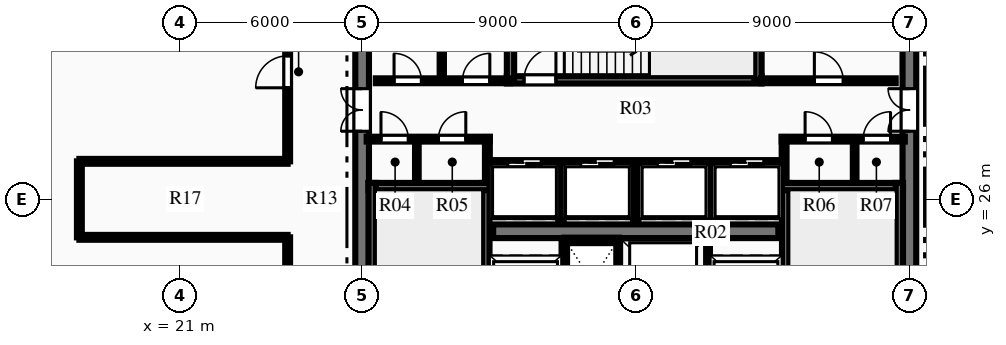
"""IFC4 building model, lengths in metres.
Left out: names, types, materials, properties, quantities, classifications, styles, units other than length and angle.
Written with IfcOpenShell. Run it as: python <this file> out.ifc"""

import sys

from ifc_helpers import new_model, si_unit, direction, frame, frame_2d, origin, place, context, subcontext, project, spatial, rectangle, extrude, element, fill, save


model = new_model("IFC4")
c1 = context("Model", 3, precision=1e-05, world=origin(), true_north=direction((0.0, 1.0)))
c2 = subcontext(c1, "Body", "Model", "MODEL_VIEW")
j1 = project(units=[si_unit("LENGTHUNIT", "METRE"), si_unit("PLANEANGLEUNIT", "RADIAN")], contexts=[c1])
p1 = place(None, origin())
s1 = spatial("IfcSite", under=j1, at=p1, CompositionType="ELEMENT")
p2 = place(p1, origin())
s2 = spatial("IfcBuilding", under=s1, at=p2, CompositionType="ELEMENT")
p3 = place(p2, frame((0.0, 0.0, 274.95)))
s3 = spatial("IfcBuildingStorey", under=s2, at=p3, CompositionType="ELEMENT", Elevation=274.95)
p4 = place(p3, frame((27.0, 18.225, 0.0), z_axis=(0.0, 0.0, 1.0), x_axis=(0.0, 1.0, 0.0)))
e1 = element("IfcWall", 1, at=p4, inside=s3, PredefinedType="SHEAR", context=c2, shape_type="SweptSolid", body=[
    extrude(rectangle(XDim=15.55, YDim=0.45, at=frame_2d((7.775, 0.0))), origin(), (0.0, 0.0, 1.0), 3.75),
])
p5 = place(p4, frame((10.015, 0.0, 0.0)))
e2 = element("IfcOpeningElement", 2, at=p5, cuts=e1, PredefinedType="OPENING", context=c2, shape_type="SweptSolid", body=[
    extrude(rectangle(XDim=1.4, YDim=2.2, at=frame_2d((0.7, 1.1))), frame((0.0, 0.235, 0.0), z_axis=(0.0, -1.0, 0.0), x_axis=(1.0, 0.0, 0.0)), (0.0, 0.0, 1.0), 0.47),
])
p6 = place(p3, frame((45.0, 18.225, 0.0), z_axis=(0.0, 0.0, 1.0), x_axis=(0.0, 1.0, 0.0)))
e3 = element("IfcWall", 3, at=p6, inside=s3, PredefinedType="SHEAR", context=c2, shape_type="SweptSolid", body=[
    extrude(rectangle(XDim=15.55, YDim=0.45, at=frame_2d((7.775, 0.0))), origin(), (0.0, 0.0, 1.0), 3.75),
])
p7 = place(p6, frame((10.015, 0.0, 0.0)))
e4 = element("IfcOpeningElement", 4, at=p7, cuts=e3, PredefinedType="OPENING", context=c2, shape_type="SweptSolid", body=[
    extrude(rectangle(XDim=1.4, YDim=2.2, at=frame_2d((0.7, 1.1))), frame((0.0, 0.235, 0.0), z_axis=(0.0, -1.0, 0.0), x_axis=(1.0, 0.0, 0.0)), (0.0, 0.0, 1.0), 0.47),
])
p8 = place(p3, frame((31.31, 24.95, 0.0), z_axis=(0.0, 0.0, 1.0), x_axis=(1.0, 0.0, 0.0)))
e5 = element("IfcWall", 5, at=p8, inside=s3, PredefinedType="SHEAR", context=c2, shape_type="SweptSolid", body=[
    extrude(rectangle(XDim=9.38, YDim=0.45, at=frame_2d((4.69, 0.0))), origin(), (0.0, 0.0, 1.0), 3.75),
])
p9 = place(p3, frame((31.07, 18.28, 0.0), z_axis=(0.0, 0.0, 1.0), x_axis=(0.0, 1.0, 0.0)))
e6 = element("IfcWall", 6, at=p9, inside=s3, PredefinedType="SHEAR", context=c2, shape_type="SweptSolid", body=[
    extrude(rectangle(XDim=8.26, YDim=0.24, at=frame_2d((4.13, 0.0))), origin(), (0.0, 0.0, 1.0), 3.75),
])
p10 = place(p9, frame((0.365, 0.0, 0.0)))
e7 = element("IfcOpeningElement", 7, at=p10, cuts=e6, PredefinedType="OPENING", context=c2, shape_type="SweptSolid", body=[
    extrude(rectangle(XDim=1.05, YDim=2.15, at=frame_2d((0.525, 1.075))), frame((0.0, 0.13, 0.0), z_axis=(0.0, -1.0, 0.0), x_axis=(1.0, 0.0, 0.0)), (0.0, 0.0, 1.0), 0.26),
])
p11 = place(p3, frame((27.21, 26.42, 0.0), z_axis=(0.0, 0.0, 1.0), x_axis=(1.0, 0.0, 0.0)))
e8 = element("IfcWall", 8, at=p11, inside=s3, PredefinedType="SHEAR", context=c2, shape_type="SweptSolid", body=[
    extrude(rectangle(XDim=3.98, YDim=0.24, at=frame_2d((1.99, 0.0))), origin(), (0.0, 0.0, 1.0), 3.75),
])
p12 = place(p3, frame((27.33, 18.28, 0.0), z_axis=(0.0, 0.0, 1.0), x_axis=(0.0, 1.0, 0.0)))
e9 = element("IfcWall", 9, at=p12, inside=s3, PredefinedType="SHEAR", context=c2, shape_type="SweptSolid", body=[
    extrude(rectangle(XDim=8.26, YDim=0.24, at=frame_2d((4.13, 0.0))), origin(), (0.0, 0.0, 1.0), 3.75),
])
p13 = place(p3, frame((40.93, 18.28, 0.0), z_axis=(0.0, 0.0, 1.0), x_axis=(0.0, 1.0, 0.0)))
e10 = element("IfcWall", 10, at=p13, inside=s3, PredefinedType="SHEAR", context=c2, shape_type="SweptSolid", body=[
    extrude(rectangle(XDim=8.26, YDim=0.24, at=frame_2d((4.13, 0.0))), origin(), (0.0, 0.0, 1.0), 3.75),
])
p14 = place(p13, frame((0.365, 0.0, 0.0)))
e11 = element("IfcOpeningElement", 11, at=p14, cuts=e10, PredefinedType="OPENING", context=c2, shape_type="SweptSolid", body=[
    extrude(rectangle(XDim=1.05, YDim=2.15, at=frame_2d((0.525, 1.075))), frame((0.0, 0.13, 0.0), z_axis=(0.0, -1.0, 0.0), x_axis=(1.0, 0.0, 0.0)), (0.0, 0.0, 1.0), 0.26),
])
p15 = place(p3, frame((40.81, 26.42, 0.0), z_axis=(0.0, 0.0, 1.0), x_axis=(1.0, 0.0, 0.0)))
e12 = element("IfcWall", 12, at=p15, inside=s3, PredefinedType="SHEAR", context=c2, shape_type="SweptSolid", body=[
    extrude(rectangle(XDim=3.98, YDim=0.24, at=frame_2d((1.99, 0.0))), origin(), (0.0, 0.0, 1.0), 3.75),
])
p16 = place(p3, frame((44.67, 18.28, 0.0), z_axis=(0.0, 0.0, 1.0), x_axis=(0.0, 1.0, 0.0)))
e13 = element("IfcWall", 13, at=p16, inside=s3, PredefinedType="SHEAR", context=c2, shape_type="SweptSolid", body=[
    extrude(rectangle(XDim=8.26, YDim=0.24, at=frame_2d((4.13, 0.0))), origin(), (0.0, 0.0, 1.0), 3.75),
])
p17 = place(p3, frame((31.76, 29.93, 0.0), z_axis=(0.0, 0.0, 1.0), x_axis=(1.0, 0.0, 0.0)))
e14 = element("IfcWall", 14, at=p17, inside=s3, PredefinedType="SHEAR", context=c2, shape_type="SweptSolid", body=[
    extrude(rectangle(XDim=8.38, YDim=0.24, at=frame_2d((4.19, 0.0))), origin(), (0.0, 0.0, 1.0), 3.75),
])
p18 = place(p17, frame((0.565, 0.0, 0.0)))
e15 = element("IfcOpeningElement", 15, at=p18, cuts=e14, PredefinedType="OPENING", context=c2, shape_type="SweptSolid", body=[
    extrude(rectangle(XDim=1.05, YDim=2.15, at=frame_2d((0.525, 1.075))), frame((0.0, 0.13, 0.0), z_axis=(0.0, -1.0, 0.0), x_axis=(1.0, 0.0, 0.0)), (0.0, 0.0, 1.0), 0.26),
])
p19 = place(p3, frame((31.88, 29.93, 0.0), z_axis=(0.0, 0.0, 1.0), x_axis=(0.0, 1.0, 0.0)))
e16 = element("IfcWall", 16, at=p19, inside=s3, PredefinedType="SHEAR", context=c2, shape_type="SweptSolid", body=[
    extrude(rectangle(XDim=3.79, YDim=0.24, at=frame_2d((1.895, 0.0))), origin(), (0.0, 0.0, 1.0), 3.75),
])
p20 = place(p3, frame((40.02, 29.93, 0.0), z_axis=(0.0, 0.0, 1.0), x_axis=(0.0, 1.0, 0.0)))
e17 = element("IfcWall", 17, at=p20, inside=s3, PredefinedType="SHEAR", context=c2, shape_type="SweptSolid", body=[
    extrude(rectangle(XDim=3.85, YDim=0.24, at=frame_2d((1.925, 0.0))), origin(), (0.0, 0.0, 1.0), 3.75),
])
for number, where, z_axis, x_axis in (
    (18, (33.65, 22.05, 0.0), (0.0, 0.0, 1.0), (0.0, 1.0, 0.0)),
    (19, (35.45, 22.05, 0.0), (0.0, 0.0, 1.0), (0.0, 1.0, 0.0)),
):
    element("IfcWall", number, at=place(p3, frame(where, z_axis=z_axis, x_axis=x_axis)), inside=s3, PredefinedType="PARTITIONING", context=c2, shape_type="SweptSolid", body=[
        extrude(rectangle(XDim=2.6, YDim=0.18, at=frame_2d((1.3, 0.0))), origin(), (0.0, 0.0, 1.0), 3.48),
    ])
p21 = place(p3, frame((33.65, 24.65, 0.0), z_axis=(0.0, 0.0, 1.0), x_axis=(1.0, 0.0, 0.0)))
e20 = element("IfcWall", 20, at=p21, inside=s3, PredefinedType="PARTITIONING", context=c2, shape_type="SweptSolid", body=[
    extrude(rectangle(XDim=1.8, YDim=0.18, at=frame_2d((0.9, 0.0))), origin(), (0.0, 0.0, 1.0), 3.48),
])
p22 = place(p3, frame((38.35, 22.05, 0.0), z_axis=(0.0, 0.0, 1.0), x_axis=(0.0, 1.0, 0.0)))
e21 = element("IfcWall", 21, at=p22, inside=s3, PredefinedType="PARTITIONING", context=c2, shape_type="SweptSolid", body=[
    extrude(rectangle(XDim=2.6, YDim=0.18, at=frame_2d((1.3, 0.0))), origin(), (0.0, 0.0, 1.0), 3.48),
])
p23 = place(p3, frame((27.15, 27.98, 0.0), z_axis=(0.0, 0.0, 1.0), x_axis=(1.0, 0.0, 0.0)))
e22 = element("IfcWall", 22, at=p23, inside=s3, PredefinedType="PARTITIONING", context=c2, shape_type="SweptSolid", body=[
    extrude(rectangle(XDim=4.05, YDim=0.16, at=frame_2d((2.025, 0.0))), origin(), (0.0, 0.0, 1.0), 3.48),
])
p24 = place(p23, frame((0.47, 0.0, 0.0)))
e23 = element("IfcOpeningElement", 23, at=p24, cuts=e22, PredefinedType="OPENING", context=c2, shape_type="SweptSolid", body=[
    extrude(rectangle(XDim=0.9, YDim=2.15, at=frame_2d((0.45, 1.075))), frame((0.0, 0.09, 0.0), z_axis=(0.0, -1.0, 0.0), x_axis=(1.0, 0.0, 0.0)), (0.0, 0.0, 1.0), 0.18),
])
p25 = place(p23, frame((2.36, 0.0, 0.0)))
e24 = element("IfcOpeningElement", 24, at=p25, cuts=e22, PredefinedType="OPENING", context=c2, shape_type="SweptSolid", body=[
    extrude(rectangle(XDim=0.9, YDim=2.15, at=frame_2d((0.45, 1.075))), frame((0.0, 0.09, 0.0), z_axis=(0.0, -1.0, 0.0), x_axis=(1.0, 0.0, 0.0)), (0.0, 0.0, 1.0), 0.18),
])
p26 = place(p3, frame((31.12, 26.54, 0.0), z_axis=(0.0, 0.0, 1.0), x_axis=(0.0, 1.0, 0.0)))
e25 = element("IfcWall", 25, at=p26, inside=s3, PredefinedType="PARTITIONING", context=c2, shape_type="SweptSolid", body=[
    extrude(rectangle(XDim=1.51, YDim=0.16, at=frame_2d((0.755, 0.0))), origin(), (0.0, 0.0, 1.0), 3.48),
])
p27 = place(p3, frame((40.8, 27.98, 0.0), z_axis=(0.0, 0.0, 1.0), x_axis=(1.0, 0.0, 0.0)))
e26 = element("IfcWall", 26, at=p27, inside=s3, PredefinedType="PARTITIONING", context=c2, shape_type="SweptSolid", body=[
    extrude(rectangle(XDim=4.05, YDim=0.16, at=frame_2d((2.025, 0.0))), origin(), (0.0, 0.0, 1.0), 3.48),
])
p28 = place(p27, frame((0.77, 0.0, 0.0)))
e27 = element("IfcOpeningElement", 27, at=p28, cuts=e26, PredefinedType="OPENING", context=c2, shape_type="SweptSolid", body=[
    extrude(rectangle(XDim=0.9, YDim=2.15, at=frame_2d((0.45, 1.075))), frame((0.0, 0.09, 0.0), z_axis=(0.0, -1.0, 0.0), x_axis=(1.0, 0.0, 0.0)), (0.0, 0.0, 1.0), 0.18),
])
p29 = place(p27, frame((2.68, 0.0, 0.0)))
e28 = element("IfcOpeningElement", 28, at=p29, cuts=e26, PredefinedType="OPENING", context=c2, shape_type="SweptSolid", body=[
    extrude(rectangle(XDim=0.9, YDim=2.15, at=frame_2d((0.45, 1.075))), frame((0.0, 0.09, 0.0), z_axis=(0.0, -1.0, 0.0), x_axis=(1.0, 0.0, 0.0)), (0.0, 0.0, 1.0), 0.18),
])
p30 = place(p3, frame((40.88, 26.54, 0.0), z_axis=(0.0, 0.0, 1.0), x_axis=(0.0, 1.0, 0.0)))
e29 = element("IfcWall", 29, at=p30, inside=s3, PredefinedType="PARTITIONING", context=c2, shape_type="SweptSolid", body=[
    extrude(rectangle(XDim=1.51, YDim=0.16, at=frame_2d((0.755, 0.0))), origin(), (0.0, 0.0, 1.0), 3.48),
])
for number, where, z_axis, x_axis in (
    (30, (28.8, 26.54, 0.0), (0.0, 0.0, 1.0), (0.0, 1.0, 0.0)),
    (31, (43.2, 26.54, 0.0), (0.0, 0.0, 1.0), (0.0, 1.0, 0.0)),
):
    element("IfcWall", number, at=place(p3, frame(where, z_axis=z_axis, x_axis=x_axis)), inside=s3, PredefinedType="PARTITIONING", context=c2, shape_type="SweptSolid", body=[
        extrude(rectangle(XDim=1.44, YDim=0.12, at=frame_2d((0.72, 0.0))), origin(), (0.0, 0.0, 1.0), 3.48),
    ])
p31 = place(p3, frame((27.45, 29.9, 0.0), z_axis=(0.0, 0.0, 1.0), x_axis=(1.0, 0.0, 0.0)))
e32 = element("IfcWall", 32, at=p31, inside=s3, PredefinedType="PARTITIONING", context=c2, shape_type="SweptSolid", body=[
    extrude(rectangle(XDim=4.43, YDim=0.16, at=frame_2d((2.215, 0.0))), origin(), (0.0, 0.0, 1.0), 3.48),
])
p32 = place(p31, frame((0.6, 0.0, 0.0)))
e33 = element("IfcOpeningElement", 33, at=p32, cuts=e32, PredefinedType="OPENING", context=c2, shape_type="SweptSolid", body=[
    extrude(rectangle(XDim=0.9, YDim=2.15, at=frame_2d((0.45, 1.075))), frame((0.0, 0.09, 0.0), z_axis=(0.0, -1.0, 0.0), x_axis=(1.0, 0.0, 0.0)), (0.0, 0.0, 1.0), 0.18),
])
p33 = place(p31, frame((2.85, 0.0, 0.0)))
e34 = element("IfcOpeningElement", 34, at=p33, cuts=e32, PredefinedType="OPENING", context=c2, shape_type="SweptSolid", body=[
    extrude(rectangle(XDim=0.9, YDim=2.15, at=frame_2d((0.45, 1.075))), frame((0.0, 0.09, 0.0), z_axis=(0.0, -1.0, 0.0), x_axis=(1.0, 0.0, 0.0)), (0.0, 0.0, 1.0), 0.18),
])
p34 = place(p3, frame((29.62, 29.95, 0.0), z_axis=(0.0, 0.0, 1.0), x_axis=(0.0, 1.0, 0.0)))
e35 = element("IfcWall", 35, at=p34, inside=s3, PredefinedType="PARTITIONING", context=c2, shape_type="SweptSolid", body=[
    extrude(rectangle(XDim=3.6, YDim=0.14, at=frame_2d((1.8, 0.0))), origin(), (0.0, 0.0, 1.0), 3.48),
])
p35 = place(p3, frame((40.12, 29.9, 0.0), z_axis=(0.0, 0.0, 1.0), x_axis=(1.0, 0.0, 0.0)))
e36 = element("IfcWall", 36, at=p35, inside=s3, PredefinedType="PARTITIONING", context=c2, shape_type="SweptSolid", body=[
    extrude(rectangle(XDim=4.43, YDim=0.16, at=frame_2d((2.215, 0.0))), origin(), (0.0, 0.0, 1.0), 3.48),
])
p36 = place(p35, frame((1.755, 0.0, 0.0)))
e37 = element("IfcOpeningElement", 37, at=p36, cuts=e36, PredefinedType="OPENING", context=c2, shape_type="SweptSolid", body=[
    extrude(rectangle(XDim=0.95, YDim=2.15, at=frame_2d((0.475, 1.075))), frame((0.0, 0.09, 0.0), z_axis=(0.0, -1.0, 0.0), x_axis=(1.0, 0.0, 0.0)), (0.0, 0.0, 1.0), 0.18),
])
p37 = place(p3, frame((31.2, 27.2, 0.0), z_axis=(0.0, 0.0, 1.0), x_axis=(1.0, 0.0, 0.0)))
e38 = element("IfcWall", 38, at=p37, inside=s3, PredefinedType="PARTITIONING", context=c2, shape_type="SweptSolid", body=[
    extrude(rectangle(XDim=9.6, YDim=0.18, at=frame_2d((4.8, 0.0))), origin(), (0.0, 0.0, 1.0), 3.48),
])
p38 = place(p37, frame((0.59, 0.0, 0.0)))
e39 = element("IfcOpeningElement", 39, at=p38, cuts=e38, PredefinedType="OPENING", context=c2, shape_type="SweptSolid", body=[
    extrude(rectangle(XDim=1.1, YDim=2.15, at=frame_2d((0.55, 1.075))), frame((0.0, 0.1, 0.0), z_axis=(0.0, -1.0, 0.0), x_axis=(1.0, 0.0, 0.0)), (0.0, 0.0, 1.0), 0.2),
])
p39 = place(p37, frame((2.99, 0.0, 0.0)))
e40 = element("IfcOpeningElement", 40, at=p39, cuts=e38, PredefinedType="OPENING", context=c2, shape_type="SweptSolid", body=[
    extrude(rectangle(XDim=1.1, YDim=2.15, at=frame_2d((0.55, 1.075))), frame((0.0, 0.1, 0.0), z_axis=(0.0, -1.0, 0.0), x_axis=(1.0, 0.0, 0.0)), (0.0, 0.0, 1.0), 0.2),
])
p40 = place(p37, frame((5.51, 0.0, 0.0)))
e41 = element("IfcOpeningElement", 41, at=p40, cuts=e38, PredefinedType="OPENING", context=c2, shape_type="SweptSolid", body=[
    extrude(rectangle(XDim=1.1, YDim=2.15, at=frame_2d((0.55, 1.075))), frame((0.0, 0.1, 0.0), z_axis=(0.0, -1.0, 0.0), x_axis=(1.0, 0.0, 0.0)), (0.0, 0.0, 1.0), 0.2),
])
p41 = place(p37, frame((7.91, 0.0, 0.0)))
e42 = element("IfcOpeningElement", 42, at=p41, cuts=e38, PredefinedType="OPENING", context=c2, shape_type="SweptSolid", body=[
    extrude(rectangle(XDim=1.1, YDim=2.15, at=frame_2d((0.55, 1.075))), frame((0.0, 0.1, 0.0), z_axis=(0.0, -1.0, 0.0), x_axis=(1.0, 0.0, 0.0)), (0.0, 0.0, 1.0), 0.2),
])
for number, where, z_axis, x_axis in (
    (43, (33.54, 25.3, 0.0), (0.0, 0.0, 1.0), (0.0, 1.0, 0.0)),
    (44, (36.0, 25.3, 0.0), (0.0, 0.0, 1.0), (0.0, 1.0, 0.0)),
    (45, (38.46, 25.3, 0.0), (0.0, 0.0, 1.0), (0.0, 1.0, 0.0)),
):
    element("IfcWall", number, at=place(p3, frame(where, z_axis=z_axis, x_axis=x_axis)), inside=s3, PredefinedType="PARTITIONING", context=c2, shape_type="SweptSolid", body=[
        extrude(rectangle(XDim=1.9, YDim=0.18, at=frame_2d((0.95, 0.0))), origin(), (0.0, 0.0, 1.0), 3.48),
    ])
p42 = place(p3, frame((24.55, 15.55, 0.0), z_axis=(0.0, 0.0, 1.0), x_axis=(0.0, 1.0, 0.0)))
e46 = element("IfcWall", 46, at=p42, inside=s3, PredefinedType="PARTITIONING", context=c2, shape_type="SweptSolid", body=[
    extrude(rectangle(XDim=9.2, YDim=0.16, at=frame_2d((4.6, 0.0))), origin(), (0.0, 0.0, 1.0), 3.48),
])
p43 = place(p3, frame((24.55, 27.25, 0.0), z_axis=(0.0, 0.0, 1.0), x_axis=(0.0, 1.0, 0.0)))
e47 = element("IfcWall", 47, at=p43, inside=s3, PredefinedType="PARTITIONING", context=c2, shape_type="SweptSolid", body=[
    extrude(rectangle(XDim=9.2, YDim=0.16, at=frame_2d((4.6, 0.0))), origin(), (0.0, 0.0, 1.0), 3.48),
])
p44 = place(p43, frame((2.419, 0.0, 0.0)))
e48 = element("IfcOpeningElement", 48, at=p44, cuts=e47, PredefinedType="OPENING", context=c2, shape_type="SweptSolid", body=[
    extrude(rectangle(XDim=1.05, YDim=2.15, at=frame_2d((0.525, 1.075))), frame((0.0, 0.09, 0.0), z_axis=(0.0, -1.0, 0.0), x_axis=(1.0, 0.0, 0.0)), (0.0, 0.0, 1.0), 0.18),
])
for number, where, z_axis, x_axis in (
    (49, (17.7, 24.75, 0.0), (0.0, 0.0, 1.0), (1.0, 0.0, 0.0)),
    (50, (17.7, 27.25, 0.0), (0.0, 0.0, 1.0), (1.0, 0.0, 0.0)),
):
    element("IfcWall", number, at=place(p3, frame(where, z_axis=z_axis, x_axis=x_axis)), inside=s3, PredefinedType="PARTITIONING", context=c2, shape_type="SweptSolid", body=[
        extrude(rectangle(XDim=6.85, YDim=0.16, at=frame_2d((3.425, 0.0))), origin(), (0.0, 0.0, 1.0), 3.48),
    ])
p45 = place(p3, frame((17.7, 24.75, 0.0), z_axis=(0.0, 0.0, 1.0), x_axis=(0.0, 1.0, 0.0)))
e51 = element("IfcWall", 51, at=p45, inside=s3, PredefinedType="PARTITIONING", context=c2, shape_type="SweptSolid", body=[
    extrude(rectangle(XDim=2.5, YDim=0.16, at=frame_2d((1.25, 0.0))), origin(), (0.0, 0.0, 1.0), 3.48),
])
p46 = place(p24, origin())
e52 = element("IfcDoor", 52, at=p46, inside=s3, OperationType="SINGLE_SWING_LEFT", PredefinedType="DOOR", context=c2, shape_type="SweptSolid", body=[
    extrude(rectangle(XDim=0.9, YDim=2.15, at=frame_2d((0.45, 1.075))), frame((0.0, 0.025, 0.0), z_axis=(0.0, -1.0, 0.0), x_axis=(1.0, 0.0, 0.0)), (0.0, 0.0, 1.0), 0.05),
])
fill(e23, e52)
p47 = place(p25, origin())
e53 = element("IfcDoor", 53, at=p47, inside=s3, OperationType="SINGLE_SWING_RIGHT", PredefinedType="DOOR", context=c2, shape_type="SweptSolid", body=[
    extrude(rectangle(XDim=0.9, YDim=2.15, at=frame_2d((0.45, 1.075))), frame((0.0, 0.025, 0.0), z_axis=(0.0, -1.0, 0.0), x_axis=(1.0, 0.0, 0.0)), (0.0, 0.0, 1.0), 0.05),
])
fill(e24, e53)
p48 = place(p28, origin())
e54 = element("IfcDoor", 54, at=p48, inside=s3, OperationType="SINGLE_SWING_LEFT", PredefinedType="DOOR", context=c2, shape_type="SweptSolid", body=[
    extrude(rectangle(XDim=0.9, YDim=2.15, at=frame_2d((0.45, 1.075))), frame((0.0, 0.025, 0.0), z_axis=(0.0, -1.0, 0.0), x_axis=(1.0, 0.0, 0.0)), (0.0, 0.0, 1.0), 0.05),
])
fill(e27, e54)
p49 = place(p29, origin())
e55 = element("IfcDoor", 55, at=p49, inside=s3, OperationType="SINGLE_SWING_RIGHT", PredefinedType="DOOR", context=c2, shape_type="SweptSolid", body=[
    extrude(rectangle(XDim=0.9, YDim=2.15, at=frame_2d((0.45, 1.075))), frame((0.0, 0.025, 0.0), z_axis=(0.0, -1.0, 0.0), x_axis=(1.0, 0.0, 0.0)), (0.0, 0.0, 1.0), 0.05),
])
fill(e28, e55)
p50 = place(p32, origin())
e56 = element("IfcDoor", 56, at=p50, inside=s3, OperationType="SINGLE_SWING_LEFT", PredefinedType="DOOR", context=c2, shape_type="SweptSolid", body=[
    extrude(rectangle(XDim=0.9, YDim=2.15, at=frame_2d((0.45, 1.075))), frame((0.0, 0.025, 0.0), z_axis=(0.0, -1.0, 0.0), x_axis=(1.0, 0.0, 0.0)), (0.0, 0.0, 1.0), 0.05),
])
fill(e33, e56)
p51 = place(p33, origin())
e57 = element("IfcDoor", 57, at=p51, inside=s3, OperationType="SINGLE_SWING_RIGHT", PredefinedType="DOOR", context=c2, shape_type="SweptSolid", body=[
    extrude(rectangle(XDim=0.9, YDim=2.15, at=frame_2d((0.45, 1.075))), frame((0.0, 0.025, 0.0), z_axis=(0.0, -1.0, 0.0), x_axis=(1.0, 0.0, 0.0)), (0.0, 0.0, 1.0), 0.05),
])
fill(e34, e57)
p52 = place(p36, origin())
e58 = element("IfcDoor", 58, at=p52, inside=s3, OperationType="SINGLE_SWING_LEFT", PredefinedType="DOOR", context=c2, shape_type="SweptSolid", body=[
    extrude(rectangle(XDim=0.95, YDim=2.15, at=frame_2d((0.475, 1.075))), frame((0.0, 0.025, 0.0), z_axis=(0.0, -1.0, 0.0), x_axis=(1.0, 0.0, 0.0)), (0.0, 0.0, 1.0), 0.05),
])
fill(e37, e58)
p53 = place(p18, origin())
e59 = element("IfcDoor", 59, at=p53, inside=s3, OperationType="SINGLE_SWING_RIGHT", PredefinedType="DOOR", context=c2, shape_type="SweptSolid", body=[
    extrude(rectangle(XDim=1.05, YDim=2.15, at=frame_2d((0.525, 1.075))), frame((0.0, 0.025, 0.0), z_axis=(0.0, -1.0, 0.0), x_axis=(1.0, 0.0, 0.0)), (0.0, 0.0, 1.0), 0.05),
])
fill(e15, e59)
p54 = place(p5, origin())
e60 = element("IfcDoor", 60, at=p54, inside=s3, OperationType="DOUBLE_DOOR_SINGLE_SWING", PredefinedType="DOOR", context=c2, shape_type="SweptSolid", body=[
    extrude(rectangle(XDim=1.4, YDim=2.2, at=frame_2d((0.7, 1.1))), frame((0.0, 0.025, 0.0), z_axis=(0.0, -1.0, 0.0), x_axis=(1.0, 0.0, 0.0)), (0.0, 0.0, 1.0), 0.05),
])
fill(e2, e60)
p55 = place(p7, origin())
e61 = element("IfcDoor", 61, at=p55, inside=s3, OperationType="DOUBLE_DOOR_SINGLE_SWING", PredefinedType="DOOR", context=c2, shape_type="SweptSolid", body=[
    extrude(rectangle(XDim=1.4, YDim=2.2, at=frame_2d((0.7, 1.1))), frame((0.0, 0.025, 0.0), z_axis=(0.0, -1.0, 0.0), x_axis=(1.0, 0.0, 0.0)), (0.0, 0.0, 1.0), 0.05),
])
fill(e4, e61)
p56 = place(p44, origin())
e62 = element("IfcDoor", 62, at=p56, inside=s3, OperationType="SINGLE_SWING_LEFT", PredefinedType="DOOR", context=c2, shape_type="SweptSolid", body=[
    extrude(rectangle(XDim=1.05, YDim=2.15, at=frame_2d((0.525, 1.075))), frame((0.0, 0.025, 0.0), z_axis=(0.0, -1.0, 0.0), x_axis=(1.0, 0.0, 0.0)), (0.0, 0.0, 1.0), 0.05),
])
fill(e48, e62)
p57 = place(p38, origin())
e63 = element("IfcDoor", 63, at=p57, inside=s3, OperationType="SLIDING_TO_LEFT", PredefinedType="DOOR", context=c2, shape_type="SweptSolid", body=[
    extrude(rectangle(XDim=1.1, YDim=2.15, at=frame_2d((0.55, 1.075))), frame((0.0, 0.025, 0.0), z_axis=(0.0, -1.0, 0.0), x_axis=(1.0, 0.0, 0.0)), (0.0, 0.0, 1.0), 0.05),
])
fill(e39, e63)
p58 = place(p39, origin())
e64 = element("IfcDoor", 64, at=p58, inside=s3, OperationType="SLIDING_TO_LEFT", PredefinedType="DOOR", context=c2, shape_type="SweptSolid", body=[
    extrude(rectangle(XDim=1.1, YDim=2.15, at=frame_2d((0.55, 1.075))), frame((0.0, 0.025, 0.0), z_axis=(0.0, -1.0, 0.0), x_axis=(1.0, 0.0, 0.0)), (0.0, 0.0, 1.0), 0.05),
])
fill(e40, e64)
p59 = place(p40, origin())
e65 = element("IfcDoor", 65, at=p59, inside=s3, OperationType="SLIDING_TO_LEFT", PredefinedType="DOOR", context=c2, shape_type="SweptSolid", body=[
    extrude(rectangle(XDim=1.1, YDim=2.15, at=frame_2d((0.55, 1.075))), frame((0.0, 0.025, 0.0), z_axis=(0.0, -1.0, 0.0), x_axis=(1.0, 0.0, 0.0)), (0.0, 0.0, 1.0), 0.05),
])
fill(e41, e65)
p60 = place(p41, origin())
e66 = element("IfcDoor", 66, at=p60, inside=s3, OperationType="SLIDING_TO_LEFT", PredefinedType="DOOR", context=c2, shape_type="SweptSolid", body=[
    extrude(rectangle(XDim=1.1, YDim=2.15, at=frame_2d((0.55, 1.075))), frame((0.0, 0.025, 0.0), z_axis=(0.0, -1.0, 0.0), x_axis=(1.0, 0.0, 0.0)), (0.0, 0.0, 1.0), 0.05),
])
fill(e42, e66)
save(model, sys.argv[1])
